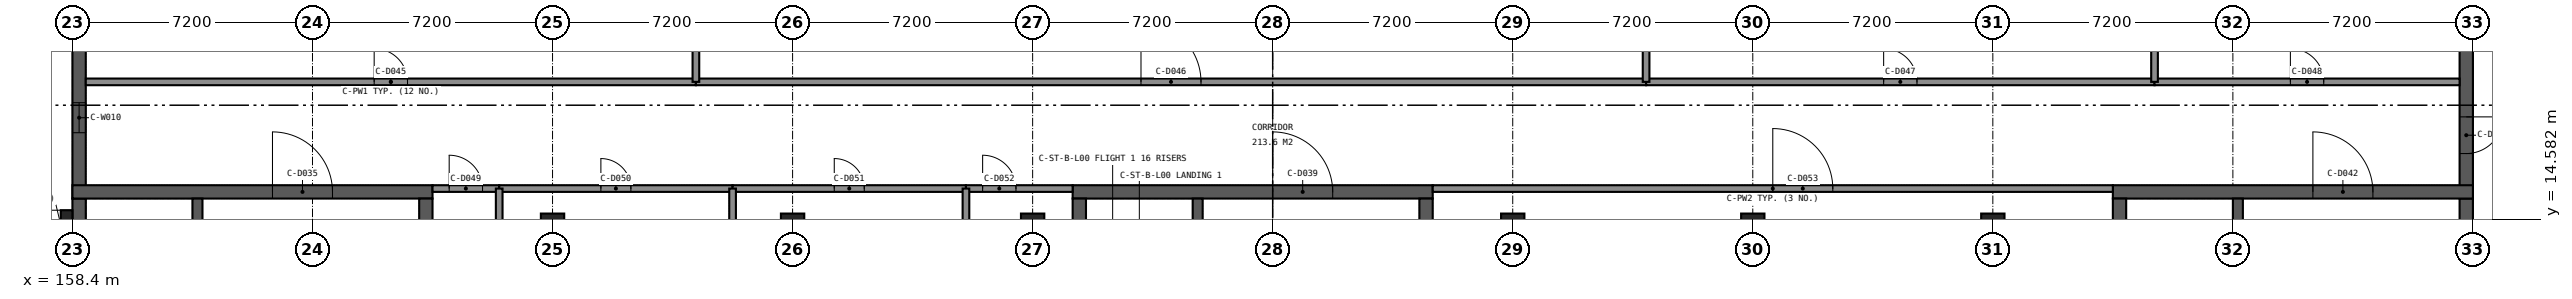
"""IFC4 building model, lengths in metres.
Left out: names, types, materials, properties, quantities, classifications, styles, units other than length and angle.
Written with IfcOpenShell. Run it as: python <this file> out.ifc"""

import sys

from ifc_helpers import new_model, si_unit, direction, frame, frame_2d, origin, origin_2d, place, context, subcontext, project, spatial, rectangle, extrude, element, fill, save


model = new_model("IFC4")
c1 = context("Model", 3, precision=1e-05, world=origin(), true_north=direction((0.0, 1.0)))
c2 = subcontext(c1, "Body", "Model", "MODEL_VIEW")
j1 = project(units=[si_unit("LENGTHUNIT", "METRE"), si_unit("PLANEANGLEUNIT", "RADIAN")], contexts=[c1])
p1 = place(None, origin())
s1 = spatial("IfcSite", under=j1, at=p1, CompositionType="ELEMENT")
p2 = place(p1, origin())
s2 = spatial("IfcBuilding", under=s1, at=p2, CompositionType="ELEMENT")
p3 = place(p2, frame((0.0, 0.0, 4.8)))
s3 = spatial("IfcBuildingStorey", under=s2, at=p3, CompositionType="ELEMENT", Elevation=4.8)
for number, where, z_axis, x_axis in (
    (1, (172.8, 14.4, 0.0), (0.0, 0.0, 1.0), (1.0, 0.0, 0.0)),
    (2, (180.0, 14.4, 0.0), (0.0, 0.0, 1.0), (1.0, 0.0, 0.0)),
    (3, (187.2, 14.4, 0.0), (0.0, 0.0, 1.0), (1.0, 0.0, 0.0)),
    (4, (201.6, 14.4, 0.0), (0.0, 0.0, 1.0), (1.0, 0.0, 0.0)),
    (5, (208.8, 14.4, 0.0), (0.0, 0.0, 1.0), (1.0, 0.0, 0.0)),
    (6, (216.0, 14.4, 0.0), (0.0, 0.0, 1.0), (1.0, 0.0, 0.0)),
):
    element("IfcColumn", number, at=place(p3, frame(where, z_axis=z_axis, x_axis=x_axis)), inside=s3, PredefinedType="COLUMN", context=c2, shape_type="SweptSolid", body=[
        extrude(rectangle(XDim=0.7, YDim=0.7, at=origin_2d()), origin(), (0.0, 0.0, 1.0), 4.8),
    ])
p4 = place(p3, frame((158.6, 15.2, 0.0), z_axis=(0.0, 0.0, 1.0), x_axis=(0.0, 1.0, 0.0)))
e7 = element("IfcWall", 7, at=p4, inside=s3, PredefinedType="SHEAR", context=c2, shape_type="SweptSolid", body=[
    extrude(rectangle(XDim=6.05, YDim=0.4, at=frame_2d((3.025, 0.0))), origin(), (0.0, 0.0, 1.0), 3.95),
])
p5 = place(p4, frame((1.975, 0.0, 1.0)))
e8 = element("IfcOpeningElement", 8, at=p5, cuts=e7, PredefinedType="OPENING", context=c2, shape_type="SweptSolid", body=[
    extrude(rectangle(XDim=0.9, YDim=2.1, at=frame_2d((0.45, 1.05))), frame((0.0, 0.21, 0.0), z_axis=(0.0, -1.0, 0.0), x_axis=(1.0, 0.0, 0.0)), (0.0, 0.0, 1.0), 0.42),
])
p6 = place(p3, frame((158.6, 7.6, 0.0), z_axis=(0.0, 0.0, 1.0), x_axis=(0.0, 1.0, 0.0)))
e9 = element("IfcWall", 9, at=p6, inside=s3, PredefinedType="SHEAR", context=c2, shape_type="SweptSolid", body=[
    extrude(rectangle(XDim=7.6, YDim=0.4, at=frame_2d((3.8, 0.0))), origin(), (0.0, 0.0, 1.0), 4.55),
])
p7 = place(p3, frame((230.2, 21.25, 0.0), z_axis=(0.0, 0.0, 1.0), x_axis=(0.0, -1.0, 0.0)))
e10 = element("IfcWall", 10, at=p7, inside=s3, PredefinedType="SHEAR", context=c2, shape_type="SweptSolid", body=[
    extrude(rectangle(XDim=6.05, YDim=0.4, at=frame_2d((3.025, 0.0))), origin(), (0.0, 0.0, 1.0), 3.95),
])
p8 = place(p7, frame((3.6, 0.0, 0.0)))
e11 = element("IfcOpeningElement", 11, at=p8, cuts=e10, PredefinedType="OPENING", context=c2, shape_type="SweptSolid", body=[
    extrude(rectangle(XDim=1.1, YDim=2.1, at=frame_2d((0.55, 1.05))), frame((0.0, 0.21, 0.0), z_axis=(0.0, -1.0, 0.0), x_axis=(1.0, 0.0, 0.0)), (0.0, 0.0, 1.0), 0.42),
])
p9 = place(p7, frame((0.639, 0.0, 1.0)))
e12 = element("IfcOpeningElement", 12, at=p9, cuts=e10, PredefinedType="OPENING", context=c2, shape_type="SweptSolid", body=[
    extrude(rectangle(XDim=0.9, YDim=2.1, at=frame_2d((0.45, 1.05))), frame((0.0, 0.21, 0.0), z_axis=(0.0, -1.0, 0.0), x_axis=(1.0, 0.0, 0.0)), (0.0, 0.0, 1.0), 0.42),
])
p10 = place(p3, frame((230.2, 15.2, 0.0), z_axis=(0.0, 0.0, 1.0), x_axis=(0.0, -1.0, 0.0)))
e13 = element("IfcWall", 13, at=p10, inside=s3, PredefinedType="SHEAR", context=c2, shape_type="SweptSolid", body=[
    extrude(rectangle(XDim=7.6, YDim=0.4, at=frame_2d((3.8, 0.0))), origin(), (0.0, 0.0, 1.0), 4.55),
])
p11 = place(p3, frame((158.4, 15.4, 0.0), z_axis=(0.0, 0.0, 1.0), x_axis=(1.0, 0.0, 0.0)))
e14 = element("IfcWall", 14, at=p11, inside=s3, PredefinedType="SHEAR", context=c2, shape_type="SweptSolid", body=[
    extrude(rectangle(XDim=10.8, YDim=0.4, at=frame_2d((5.4, 0.0))), origin(), (0.0, 0.0, 1.0), 4.55),
])
p12 = place(p11, frame((6.0, 0.0, 0.0)))
e15 = element("IfcOpeningElement", 15, at=p12, cuts=e14, PredefinedType="OPENING", context=c2, shape_type="SweptSolid", body=[
    extrude(rectangle(XDim=1.8, YDim=2.1, at=frame_2d((0.9, 1.05))), frame((0.0, 0.21, 0.0), z_axis=(0.0, -1.0, 0.0), x_axis=(1.0, 0.0, 0.0)), (0.0, 0.0, 1.0), 0.42),
])
p13 = place(p3, frame((169.0, 15.2, 0.0), z_axis=(0.0, 0.0, 1.0), x_axis=(0.0, -1.0, 0.0)))
e16 = element("IfcWall", 16, at=p13, inside=s3, PredefinedType="SHEAR", context=c2, shape_type="SweptSolid", body=[
    extrude(rectangle(XDim=7.6, YDim=0.4, at=frame_2d((3.8, 0.0))), origin(), (0.0, 0.0, 1.0), 4.55),
])
p14 = place(p3, frame((162.15, 15.2, 0.0), z_axis=(0.0, 0.0, 1.0), x_axis=(0.0, -1.0, 0.0)))
e17 = element("IfcWall", 17, at=p14, inside=s3, PredefinedType="SHEAR", context=c2, shape_type="SweptSolid", body=[
    extrude(rectangle(XDim=7.6, YDim=0.3, at=frame_2d((3.8, 0.0))), origin(), (0.0, 0.0, 1.0), 4.55),
])
p15 = place(p14, frame((6.35, 0.0, 0.0)))
e18 = element("IfcOpeningElement", 18, at=p15, cuts=e17, PredefinedType="OPENING", context=c2, shape_type="SweptSolid", body=[
    extrude(rectangle(XDim=1.0, YDim=2.1, at=frame_2d((0.5, 1.05))), frame((0.0, 0.16, 0.0), z_axis=(0.0, -1.0, 0.0), x_axis=(1.0, 0.0, 0.0)), (0.0, 0.0, 1.0), 0.32),
])
p16 = place(p3, frame((188.4, 15.4, 0.0), z_axis=(0.0, 0.0, 1.0), x_axis=(1.0, 0.0, 0.0)))
e19 = element("IfcWall", 19, at=p16, inside=s3, PredefinedType="SHEAR", context=c2, shape_type="SweptSolid", body=[
    extrude(rectangle(XDim=10.8, YDim=0.4, at=frame_2d((5.4, 0.0))), origin(), (0.0, 0.0, 1.0), 4.55),
])
p17 = place(p16, frame((6.0, 0.0, 0.0)))
e20 = element("IfcOpeningElement", 20, at=p17, cuts=e19, PredefinedType="OPENING", context=c2, shape_type="SweptSolid", body=[
    extrude(rectangle(XDim=1.8, YDim=2.1, at=frame_2d((0.9, 1.05))), frame((0.0, 0.21, 0.0), z_axis=(0.0, -1.0, 0.0), x_axis=(1.0, 0.0, 0.0)), (0.0, 0.0, 1.0), 0.42),
])
for number, where, z_axis, x_axis in (
    (21, (188.6, 15.2, 0.0), (0.0, 0.0, 1.0), (0.0, -1.0, 0.0)),
    (22, (199.0, 15.2, 0.0), (0.0, 0.0, 1.0), (0.0, -1.0, 0.0)),
):
    element("IfcWall", number, at=place(p3, frame(where, z_axis=z_axis, x_axis=x_axis)), inside=s3, PredefinedType="SHEAR", context=c2, shape_type="SweptSolid", body=[
        extrude(rectangle(XDim=7.6, YDim=0.4, at=frame_2d((3.8, 0.0))), origin(), (0.0, 0.0, 1.0), 4.55),
    ])
p18 = place(p3, frame((192.15, 15.2, 0.0), z_axis=(0.0, 0.0, 1.0), x_axis=(0.0, -1.0, 0.0)))
e23 = element("IfcWall", 23, at=p18, inside=s3, PredefinedType="SHEAR", context=c2, shape_type="SweptSolid", body=[
    extrude(rectangle(XDim=7.6, YDim=0.3, at=frame_2d((3.8, 0.0))), origin(), (0.0, 0.0, 1.0), 4.55),
])
p19 = place(p18, frame((6.35, 0.0, 0.0)))
e24 = element("IfcOpeningElement", 24, at=p19, cuts=e23, PredefinedType="OPENING", context=c2, shape_type="SweptSolid", body=[
    extrude(rectangle(XDim=1.0, YDim=2.1, at=frame_2d((0.5, 1.05))), frame((0.0, 0.16, 0.0), z_axis=(0.0, -1.0, 0.0), x_axis=(1.0, 0.0, 0.0)), (0.0, 0.0, 1.0), 0.32),
])
p20 = place(p3, frame((219.6, 15.4, 0.0), z_axis=(0.0, 0.0, 1.0), x_axis=(1.0, 0.0, 0.0)))
e25 = element("IfcWall", 25, at=p20, inside=s3, PredefinedType="SHEAR", context=c2, shape_type="SweptSolid", body=[
    extrude(rectangle(XDim=10.8, YDim=0.4, at=frame_2d((5.4, 0.0))), origin(), (0.0, 0.0, 1.0), 4.55),
])
p21 = place(p20, frame((6.0, 0.0, 0.0)))
e26 = element("IfcOpeningElement", 26, at=p21, cuts=e25, PredefinedType="OPENING", context=c2, shape_type="SweptSolid", body=[
    extrude(rectangle(XDim=1.8, YDim=2.1, at=frame_2d((0.9, 1.05))), frame((0.0, 0.21, 0.0), z_axis=(0.0, -1.0, 0.0), x_axis=(1.0, 0.0, 0.0)), (0.0, 0.0, 1.0), 0.42),
])
p22 = place(p3, frame((219.8, 15.2, 0.0), z_axis=(0.0, 0.0, 1.0), x_axis=(0.0, -1.0, 0.0)))
e27 = element("IfcWall", 27, at=p22, inside=s3, PredefinedType="SHEAR", context=c2, shape_type="SweptSolid", body=[
    extrude(rectangle(XDim=7.6, YDim=0.4, at=frame_2d((3.8, 0.0))), origin(), (0.0, 0.0, 1.0), 4.55),
])
p23 = place(p3, frame((223.35, 15.2, 0.0), z_axis=(0.0, 0.0, 1.0), x_axis=(0.0, -1.0, 0.0)))
e28 = element("IfcWall", 28, at=p23, inside=s3, PredefinedType="SHEAR", context=c2, shape_type="SweptSolid", body=[
    extrude(rectangle(XDim=7.6, YDim=0.3, at=frame_2d((3.8, 0.0))), origin(), (0.0, 0.0, 1.0), 4.55),
])
p24 = place(p23, frame((6.35, 0.0, 0.0)))
e29 = element("IfcOpeningElement", 29, at=p24, cuts=e28, PredefinedType="OPENING", context=c2, shape_type="SweptSolid", body=[
    extrude(rectangle(XDim=1.0, YDim=2.1, at=frame_2d((0.5, 1.05))), frame((0.0, 0.16, 0.0), z_axis=(0.0, -1.0, 0.0), x_axis=(1.0, 0.0, 0.0)), (0.0, 0.0, 1.0), 0.32),
])
p25 = place(p3, frame((158.225, 14.4, 0.0), z_axis=(0.0, 0.0, 1.0), x_axis=(0.0, 1.0, 0.0)))
e30 = element("IfcColumn", 30, at=p25, inside=s3, PredefinedType="PILASTER", context=c2, shape_type="SweptSolid", body=[
    extrude(rectangle(XDim=0.9, YDim=0.35, at=origin_2d()), origin(), (0.0, 0.0, 1.0), 4.8),
])
p26 = place(p3, frame((158.8, 18.7, 0.0), z_axis=(0.0, 0.0, 1.0), x_axis=(1.0, 0.0, 0.0)))
e31 = element("IfcWall", 31, at=p26, inside=s3, PredefinedType="PARTITIONING", context=c2, shape_type="SweptSolid", body=[
    extrude(rectangle(XDim=18.3, YDim=0.2, at=frame_2d((9.15, 0.0))), origin(), (0.0, 0.0, 1.0), 3.95),
])
p27 = place(p26, frame((8.65, 0.0, 0.0)))
e32 = element("IfcOpeningElement", 32, at=p27, cuts=e31, PredefinedType="OPENING", context=c2, shape_type="SweptSolid", body=[
    extrude(rectangle(XDim=1.0, YDim=2.1, at=frame_2d((0.5, 1.05))), frame((0.0, 0.11, 0.0), z_axis=(0.0, -1.0, 0.0), x_axis=(1.0, 0.0, 0.0)), (0.0, 0.0, 1.0), 0.22),
])
p28 = place(p3, frame((177.1, 18.7, 0.0), z_axis=(0.0, 0.0, 1.0), x_axis=(1.0, 0.0, 0.0)))
e33 = element("IfcWall", 33, at=p28, inside=s3, PredefinedType="PARTITIONING", context=c2, shape_type="SweptSolid", body=[
    extrude(rectangle(XDim=28.5, YDim=0.2, at=frame_2d((14.25, 0.0))), origin(), (0.0, 0.0, 1.0), 3.95),
])
p29 = place(p28, frame((13.35, 0.0, 0.0)))
e34 = element("IfcOpeningElement", 34, at=p29, cuts=e33, PredefinedType="OPENING", context=c2, shape_type="SweptSolid", body=[
    extrude(rectangle(XDim=1.8, YDim=2.1, at=frame_2d((0.9, 1.05))), frame((0.0, 0.11, 0.0), z_axis=(0.0, -1.0, 0.0), x_axis=(1.0, 0.0, 0.0)), (0.0, 0.0, 1.0), 0.22),
])
p30 = place(p3, frame((205.6, 18.7, 0.0), z_axis=(0.0, 0.0, 1.0), x_axis=(1.0, 0.0, 0.0)))
e35 = element("IfcWall", 35, at=p30, inside=s3, PredefinedType="PARTITIONING", context=c2, shape_type="SweptSolid", body=[
    extrude(rectangle(XDim=15.25, YDim=0.2, at=frame_2d((7.625, 0.0))), origin(), (0.0, 0.0, 1.0), 3.95),
])
p31 = place(p30, frame((7.125, 0.0, 0.0)))
e36 = element("IfcOpeningElement", 36, at=p31, cuts=e35, PredefinedType="OPENING", context=c2, shape_type="SweptSolid", body=[
    extrude(rectangle(XDim=1.0, YDim=2.1, at=frame_2d((0.5, 1.05))), frame((0.0, 0.11, 0.0), z_axis=(0.0, -1.0, 0.0), x_axis=(1.0, 0.0, 0.0)), (0.0, 0.0, 1.0), 0.22),
])
p32 = place(p3, frame((220.85, 18.7, 0.0), z_axis=(0.0, 0.0, 1.0), x_axis=(1.0, 0.0, 0.0)))
e37 = element("IfcWall", 37, at=p32, inside=s3, PredefinedType="PARTITIONING", context=c2, shape_type="SweptSolid", body=[
    extrude(rectangle(XDim=9.15, YDim=0.2, at=frame_2d((4.575, 0.0))), origin(), (0.0, 0.0, 1.0), 3.95),
])
p33 = place(p32, frame((4.075, 0.0, 0.0)))
e38 = element("IfcOpeningElement", 38, at=p33, cuts=e37, PredefinedType="OPENING", context=c2, shape_type="SweptSolid", body=[
    extrude(rectangle(XDim=1.0, YDim=2.1, at=frame_2d((0.5, 1.05))), frame((0.0, 0.11, 0.0), z_axis=(0.0, -1.0, 0.0), x_axis=(1.0, 0.0, 0.0)), (0.0, 0.0, 1.0), 0.22),
])
p34 = place(p3, frame((169.2, 15.5, 0.0), z_axis=(0.0, 0.0, 1.0), x_axis=(1.0, 0.0, 0.0)))
e39 = element("IfcWall", 39, at=p34, inside=s3, PredefinedType="PARTITIONING", context=c2, shape_type="SweptSolid", body=[
    extrude(rectangle(XDim=2.0, YDim=0.2, at=frame_2d((1.0, 0.0))), origin(), (0.0, 0.0, 1.0), 3.95),
])
p35 = place(p34, frame((0.5, 0.0, 0.0)))
e40 = element("IfcOpeningElement", 40, at=p35, cuts=e39, PredefinedType="OPENING", context=c2, shape_type="SweptSolid", body=[
    extrude(rectangle(XDim=1.0, YDim=2.1, at=frame_2d((0.5, 1.05))), frame((0.0, 0.11, 0.0), z_axis=(0.0, -1.0, 0.0), x_axis=(1.0, 0.0, 0.0)), (0.0, 0.0, 1.0), 0.22),
])
p36 = place(p3, frame((171.2, 15.5, 0.0), z_axis=(0.0, 0.0, 1.0), x_axis=(1.0, 0.0, 0.0)))
e41 = element("IfcWall", 41, at=p36, inside=s3, PredefinedType="PARTITIONING", context=c2, shape_type="SweptSolid", body=[
    extrude(rectangle(XDim=7.0, YDim=0.2, at=frame_2d((3.5, 0.0))), origin(), (0.0, 0.0, 1.0), 3.95),
])
p37 = place(p36, frame((3.05, 0.0, 0.0)))
e42 = element("IfcOpeningElement", 42, at=p37, cuts=e41, PredefinedType="OPENING", context=c2, shape_type="SweptSolid", body=[
    extrude(rectangle(XDim=0.9, YDim=2.1, at=frame_2d((0.45, 1.05))), frame((0.0, 0.11, 0.0), z_axis=(0.0, -1.0, 0.0), x_axis=(1.0, 0.0, 0.0)), (0.0, 0.0, 1.0), 0.22),
])
p38 = place(p3, frame((178.2, 15.5, 0.0), z_axis=(0.0, 0.0, 1.0), x_axis=(1.0, 0.0, 0.0)))
e43 = element("IfcWall", 43, at=p38, inside=s3, PredefinedType="PARTITIONING", context=c2, shape_type="SweptSolid", body=[
    extrude(rectangle(XDim=7.0, YDim=0.2, at=frame_2d((3.5, 0.0))), origin(), (0.0, 0.0, 1.0), 3.95),
])
p39 = place(p38, frame((3.05, 0.0, 0.0)))
e44 = element("IfcOpeningElement", 44, at=p39, cuts=e43, PredefinedType="OPENING", context=c2, shape_type="SweptSolid", body=[
    extrude(rectangle(XDim=0.9, YDim=2.1, at=frame_2d((0.45, 1.05))), frame((0.0, 0.11, 0.0), z_axis=(0.0, -1.0, 0.0), x_axis=(1.0, 0.0, 0.0)), (0.0, 0.0, 1.0), 0.22),
])
p40 = place(p3, frame((185.2, 15.5, 0.0), z_axis=(0.0, 0.0, 1.0), x_axis=(1.0, 0.0, 0.0)))
e45 = element("IfcWall", 45, at=p40, inside=s3, PredefinedType="PARTITIONING", context=c2, shape_type="SweptSolid", body=[
    extrude(rectangle(XDim=3.2, YDim=0.2, at=frame_2d((1.6, 0.0))), origin(), (0.0, 0.0, 1.0), 3.95),
])
p41 = place(p40, frame((0.5, 0.0, 0.0)))
e46 = element("IfcOpeningElement", 46, at=p41, cuts=e45, PredefinedType="OPENING", context=c2, shape_type="SweptSolid", body=[
    extrude(rectangle(XDim=1.0, YDim=2.1, at=frame_2d((0.5, 1.05))), frame((0.0, 0.11, 0.0), z_axis=(0.0, -1.0, 0.0), x_axis=(1.0, 0.0, 0.0)), (0.0, 0.0, 1.0), 0.22),
])
p42 = place(p3, frame((199.2, 15.5, 0.0), z_axis=(0.0, 0.0, 1.0), x_axis=(1.0, 0.0, 0.0)))
e47 = element("IfcWall", 47, at=p42, inside=s3, PredefinedType="PARTITIONING", context=c2, shape_type="SweptSolid", body=[
    extrude(rectangle(XDim=20.4, YDim=0.2, at=frame_2d((10.2, 0.0))), origin(), (0.0, 0.0, 1.0), 3.95),
])
p43 = place(p42, frame((10.2, 0.0, 0.0)))
e48 = element("IfcOpeningElement", 48, at=p43, cuts=e47, PredefinedType="OPENING", context=c2, shape_type="SweptSolid", body=[
    extrude(rectangle(XDim=1.8, YDim=2.1, at=frame_2d((0.9, 1.05))), frame((0.0, 0.11, 0.0), z_axis=(0.0, -1.0, 0.0), x_axis=(1.0, 0.0, 0.0)), (0.0, 0.0, 1.0), 0.22),
])
p44 = place(p3, frame((171.2, 15.5, 0.0), z_axis=(0.0, 0.0, 1.0), x_axis=(0.0, -1.0, 0.0)))
e49 = element("IfcWall", 49, at=p44, inside=s3, PredefinedType="PARTITIONING", context=c2, shape_type="SweptSolid", body=[
    extrude(rectangle(XDim=7.9, YDim=0.2, at=frame_2d((3.95, 0.0))), origin(), (0.0, 0.0, 1.0), 3.95),
])
p45 = place(p3, frame((177.1, 28.4, 0.0), z_axis=(0.0, 0.0, 1.0), x_axis=(0.0, -1.0, 0.0)))
e50 = element("IfcWall", 50, at=p45, inside=s3, PredefinedType="PARTITIONING", context=c2, shape_type="SweptSolid", body=[
    extrude(rectangle(XDim=9.7, YDim=0.2, at=frame_2d((4.85, 0.0))), origin(), (0.0, 0.0, 1.0), 3.95),
])
for number, where, z_axis, x_axis in (
    (51, (178.2, 15.5, 0.0), (0.0, 0.0, 1.0), (0.0, -1.0, 0.0)),
    (52, (185.2, 15.5, 0.0), (0.0, 0.0, 1.0), (0.0, -1.0, 0.0)),
):
    element("IfcWall", number, at=place(p3, frame(where, z_axis=z_axis, x_axis=x_axis)), inside=s3, PredefinedType="PARTITIONING", context=c2, shape_type="SweptSolid", body=[
        extrude(rectangle(XDim=7.9, YDim=0.2, at=frame_2d((3.95, 0.0))), origin(), (0.0, 0.0, 1.0), 3.95),
    ])
for number, where, z_axis, x_axis in (
    (53, (205.6, 28.4, 0.0), (0.0, 0.0, 1.0), (0.0, -1.0, 0.0)),
    (54, (220.85, 28.4, 0.0), (0.0, 0.0, 1.0), (0.0, -1.0, 0.0)),
):
    element("IfcWall", number, at=place(p3, frame(where, z_axis=z_axis, x_axis=x_axis)), inside=s3, PredefinedType="PARTITIONING", context=c2, shape_type="SweptSolid", body=[
        extrude(rectangle(XDim=9.7, YDim=0.2, at=frame_2d((4.85, 0.0))), origin(), (0.0, 0.0, 1.0), 3.95),
    ])
p46 = place(p5, origin())
e55 = element("IfcWindow", 55, at=p46, inside=s3, PartitioningType="SINGLE_PANEL", PredefinedType="WINDOW", context=c2, shape_type="SweptSolid", body=[
    extrude(rectangle(XDim=0.9, YDim=2.1, at=frame_2d((0.45, 1.05))), frame((0.0, -0.09, 0.0), z_axis=(0.0, -1.0, 0.0), x_axis=(1.0, 0.0, 0.0)), (0.0, 0.0, 1.0), 0.06),
])
fill(e8, e55)
p47 = place(p8, origin())
e56 = element("IfcDoor", 56, at=p47, inside=s3, OperationType="NOTDEFINED", PredefinedType="DOOR", context=c2, shape_type="SweptSolid", body=[
    extrude(rectangle(XDim=1.1, YDim=2.1, at=frame_2d((0.55, 1.05))), frame((0.0, 0.025, 0.0), z_axis=(0.0, -1.0, 0.0), x_axis=(1.0, 0.0, 0.0)), (0.0, 0.0, 1.0), 0.05),
])
fill(e11, e56)
p48 = place(p12, origin())
e57 = element("IfcDoor", 57, at=p48, inside=s3, OperationType="NOTDEFINED", PredefinedType="DOOR", context=c2, shape_type="SweptSolid", body=[
    extrude(rectangle(XDim=1.8, YDim=2.1, at=frame_2d((0.9, 1.05))), frame((0.0, 0.025, 0.0), z_axis=(0.0, -1.0, 0.0), x_axis=(1.0, 0.0, 0.0)), (0.0, 0.0, 1.0), 0.05),
])
fill(e15, e57)
p49 = place(p17, origin())
e58 = element("IfcDoor", 58, at=p49, inside=s3, OperationType="NOTDEFINED", PredefinedType="DOOR", context=c2, shape_type="SweptSolid", body=[
    extrude(rectangle(XDim=1.8, YDim=2.1, at=frame_2d((0.9, 1.05))), frame((0.0, 0.025, 0.0), z_axis=(0.0, -1.0, 0.0), x_axis=(1.0, 0.0, 0.0)), (0.0, 0.0, 1.0), 0.05),
])
fill(e20, e58)
p50 = place(p21, origin())
e59 = element("IfcDoor", 59, at=p50, inside=s3, OperationType="NOTDEFINED", PredefinedType="DOOR", context=c2, shape_type="SweptSolid", body=[
    extrude(rectangle(XDim=1.8, YDim=2.1, at=frame_2d((0.9, 1.05))), frame((0.0, 0.025, 0.0), z_axis=(0.0, -1.0, 0.0), x_axis=(1.0, 0.0, 0.0)), (0.0, 0.0, 1.0), 0.05),
])
fill(e26, e59)
p51 = place(p27, origin())
e60 = element("IfcDoor", 60, at=p51, inside=s3, OperationType="NOTDEFINED", PredefinedType="DOOR", context=c2, shape_type="SweptSolid", body=[
    extrude(rectangle(XDim=1.0, YDim=2.1, at=frame_2d((0.5, 1.05))), frame((0.0, 0.025, 0.0), z_axis=(0.0, -1.0, 0.0), x_axis=(1.0, 0.0, 0.0)), (0.0, 0.0, 1.0), 0.05),
])
fill(e32, e60)
p52 = place(p29, origin())
e61 = element("IfcDoor", 61, at=p52, inside=s3, OperationType="NOTDEFINED", PredefinedType="DOOR", context=c2, shape_type="SweptSolid", body=[
    extrude(rectangle(XDim=1.8, YDim=2.1, at=frame_2d((0.9, 1.05))), frame((0.0, 0.025, 0.0), z_axis=(0.0, -1.0, 0.0), x_axis=(1.0, 0.0, 0.0)), (0.0, 0.0, 1.0), 0.05),
])
fill(e34, e61)
p53 = place(p31, origin())
e62 = element("IfcDoor", 62, at=p53, inside=s3, OperationType="NOTDEFINED", PredefinedType="DOOR", context=c2, shape_type="SweptSolid", body=[
    extrude(rectangle(XDim=1.0, YDim=2.1, at=frame_2d((0.5, 1.05))), frame((0.0, 0.025, 0.0), z_axis=(0.0, -1.0, 0.0), x_axis=(1.0, 0.0, 0.0)), (0.0, 0.0, 1.0), 0.05),
])
fill(e36, e62)
p54 = place(p33, origin())
e63 = element("IfcDoor", 63, at=p54, inside=s3, OperationType="NOTDEFINED", PredefinedType="DOOR", context=c2, shape_type="SweptSolid", body=[
    extrude(rectangle(XDim=1.0, YDim=2.1, at=frame_2d((0.5, 1.05))), frame((0.0, 0.025, 0.0), z_axis=(0.0, -1.0, 0.0), x_axis=(1.0, 0.0, 0.0)), (0.0, 0.0, 1.0), 0.05),
])
fill(e38, e63)
p55 = place(p35, origin())
e64 = element("IfcDoor", 64, at=p55, inside=s3, OperationType="NOTDEFINED", PredefinedType="DOOR", context=c2, shape_type="SweptSolid", body=[
    extrude(rectangle(XDim=1.0, YDim=2.1, at=frame_2d((0.5, 1.05))), frame((0.0, 0.025, 0.0), z_axis=(0.0, -1.0, 0.0), x_axis=(1.0, 0.0, 0.0)), (0.0, 0.0, 1.0), 0.05),
])
fill(e40, e64)
p56 = place(p37, origin())
e65 = element("IfcDoor", 65, at=p56, inside=s3, OperationType="NOTDEFINED", PredefinedType="DOOR", context=c2, shape_type="SweptSolid", body=[
    extrude(rectangle(XDim=0.9, YDim=2.1, at=frame_2d((0.45, 1.05))), frame((0.0, 0.025, 0.0), z_axis=(0.0, -1.0, 0.0), x_axis=(1.0, 0.0, 0.0)), (0.0, 0.0, 1.0), 0.05),
])
fill(e42, e65)
p57 = place(p39, origin())
e66 = element("IfcDoor", 66, at=p57, inside=s3, OperationType="NOTDEFINED", PredefinedType="DOOR", context=c2, shape_type="SweptSolid", body=[
    extrude(rectangle(XDim=0.9, YDim=2.1, at=frame_2d((0.45, 1.05))), frame((0.0, 0.025, 0.0), z_axis=(0.0, -1.0, 0.0), x_axis=(1.0, 0.0, 0.0)), (0.0, 0.0, 1.0), 0.05),
])
fill(e44, e66)
p58 = place(p41, origin())
e67 = element("IfcDoor", 67, at=p58, inside=s3, OperationType="NOTDEFINED", PredefinedType="DOOR", context=c2, shape_type="SweptSolid", body=[
    extrude(rectangle(XDim=1.0, YDim=2.1, at=frame_2d((0.5, 1.05))), frame((0.0, 0.025, 0.0), z_axis=(0.0, -1.0, 0.0), x_axis=(1.0, 0.0, 0.0)), (0.0, 0.0, 1.0), 0.05),
])
fill(e46, e67)
p59 = place(p43, origin())
e68 = element("IfcDoor", 68, at=p59, inside=s3, OperationType="NOTDEFINED", PredefinedType="DOOR", context=c2, shape_type="SweptSolid", body=[
    extrude(rectangle(XDim=1.8, YDim=2.1, at=frame_2d((0.9, 1.05))), frame((0.0, 0.025, 0.0), z_axis=(0.0, -1.0, 0.0), x_axis=(1.0, 0.0, 0.0)), (0.0, 0.0, 1.0), 0.05),
])
fill(e48, e68)
save(model, sys.argv[1])
